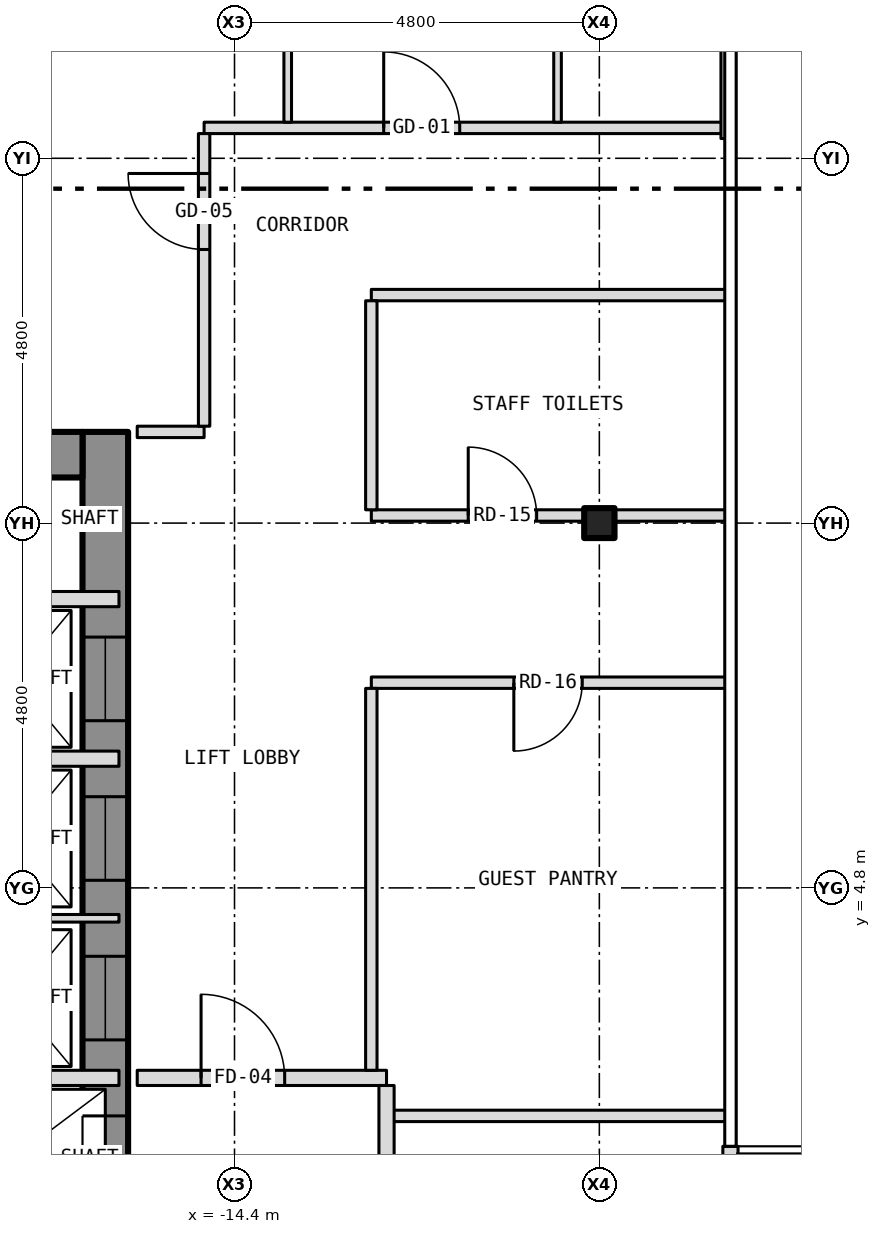
"""IFC4 building model, lengths in metres.
Left out: names, types, materials, properties, quantities, classifications, styles, units other than length and angle.
Written with IfcOpenShell. Run it as: python <this file> out.ifc"""

import sys

from ifc_helpers import new_model, si_unit, direction, frame, frame_2d, origin, origin_2d, place, context, subcontext, project, spatial, rectangle, i_section, extrude, element, fill, save


model = new_model("IFC4")
c1 = context("Model", 3, precision=1e-05, world=origin(), true_north=direction((0.0, 1.0)))
c2 = subcontext(c1, "Body", "Model", "MODEL_VIEW")
j1 = project(units=[si_unit("LENGTHUNIT", "METRE"), si_unit("PLANEANGLEUNIT", "RADIAN")], contexts=[c1])
p1 = place(None, origin())
s1 = spatial("IfcSite", under=j1, at=p1, CompositionType="ELEMENT")
p2 = place(p1, origin())
s2 = spatial("IfcBuilding", under=s1, at=p2, CompositionType="ELEMENT")
p3 = place(p2, frame((0.0, 0.0, 131.0)))
s3 = spatial("IfcBuildingStorey", under=s2, at=p3, CompositionType="ELEMENT", Elevation=131.0)
p4 = place(p3, frame((-9.6, 9.6, -0.15), z_axis=(0.0, 0.0, 1.0), x_axis=(1.0, 0.0, 0.0)))
e1 = element("IfcColumn", 1, at=p4, inside=s3, PredefinedType="COLUMN", context=c2, shape_type="SweptSolid", body=[
    extrude(i_section(OverallWidth=0.399, OverallDepth=0.394, WebThickness=0.023, FlangeThickness=0.037, at=origin_2d()), origin(), (0.0, 0.0, 1.0), 3.5),
])
p5 = place(p3, frame((-16.1, -10.8, 0.0), z_axis=(0.0, 0.0, 1.0), x_axis=(0.0, 1.0, 0.0)))
e2 = element("IfcWall", 2, at=p5, inside=s3, PredefinedType="SHEAR", context=c2, shape_type="SweptSolid", body=[
    extrude(rectangle(XDim=21.6, YDim=0.6, at=frame_2d((10.8, 0.0))), origin(), (0.0, 0.0, 1.0), 3.25),
])
p6 = place(p5, frame((9.4, 0.0, 0.0)))
e3 = element("IfcOpeningElement", 3, at=p6, cuts=e2, PredefinedType="OPENING", context=c2, shape_type="SweptSolid", body=[
    extrude(rectangle(XDim=1.1, YDim=2.1, at=frame_2d((0.55, 1.05))), frame((0.0, 0.312, 0.0), z_axis=(0.0, -1.0, 0.0), x_axis=(1.0, 0.0, 0.0)), (0.0, 0.0, 1.0), 0.624),
])
p7 = place(p5, frame((11.5, 0.0, 0.0)))
e4 = element("IfcOpeningElement", 4, at=p7, cuts=e2, PredefinedType="OPENING", context=c2, shape_type="SweptSolid", body=[
    extrude(rectangle(XDim=1.1, YDim=2.1, at=frame_2d((0.55, 1.05))), frame((0.0, 0.312, 0.0), z_axis=(0.0, -1.0, 0.0), x_axis=(1.0, 0.0, 0.0)), (0.0, 0.0, 1.0), 0.624),
])
p8 = place(p5, frame((13.6, 0.0, 0.0)))
e5 = element("IfcOpeningElement", 5, at=p8, cuts=e2, PredefinedType="OPENING", context=c2, shape_type="SweptSolid", body=[
    extrude(rectangle(XDim=1.1, YDim=2.1, at=frame_2d((0.55, 1.05))), frame((0.0, 0.312, 0.0), z_axis=(0.0, -1.0, 0.0), x_axis=(1.0, 0.0, 0.0)), (0.0, 0.0, 1.0), 0.624),
])
p9 = place(p5, frame((15.7, 0.0, 0.0)))
e6 = element("IfcOpeningElement", 6, at=p9, cuts=e2, PredefinedType="OPENING", context=c2, shape_type="SweptSolid", body=[
    extrude(rectangle(XDim=1.1, YDim=2.1, at=frame_2d((0.55, 1.05))), frame((0.0, 0.312, 0.0), z_axis=(0.0, -1.0, 0.0), x_axis=(1.0, 0.0, 0.0)), (0.0, 0.0, 1.0), 0.624),
])
p10 = place(p5, frame((17.8, 0.0, 0.0)))
e7 = element("IfcOpeningElement", 7, at=p10, cuts=e2, PredefinedType="OPENING", context=c2, shape_type="SweptSolid", body=[
    extrude(rectangle(XDim=1.1, YDim=2.1, at=frame_2d((0.55, 1.05))), frame((0.0, 0.312, 0.0), z_axis=(0.0, -1.0, 0.0), x_axis=(1.0, 0.0, 0.0)), (0.0, 0.0, 1.0), 0.624),
])
p11 = place(p5, frame((0.758, 0.0, 0.0)))
e8 = element("IfcOpeningElement", 8, at=p11, cuts=e2, PredefinedType="OPENING", context=c2, shape_type="SweptSolid", body=[
    extrude(rectangle(XDim=1.1, YDim=2.1, at=frame_2d((0.55, 1.05))), frame((0.0, 0.312, 0.0), z_axis=(0.0, -1.0, 0.0), x_axis=(1.0, 0.0, 0.0)), (0.0, 0.0, 1.0), 0.624),
])
p12 = place(p5, frame((7.5, 0.0, 0.0)))
e9 = element("IfcOpeningElement", 9, at=p12, cuts=e2, PredefinedType="OPENING", context=c2, shape_type="SweptSolid", body=[
    extrude(rectangle(XDim=1.1, YDim=2.1, at=frame_2d((0.55, 1.05))), frame((0.0, 0.312, 0.0), z_axis=(0.0, -1.0, 0.0), x_axis=(1.0, 0.0, 0.0)), (0.0, 0.0, 1.0), 0.624),
])
p13 = place(p3, frame((-22.2, 10.5, 0.0), z_axis=(0.0, 0.0, 1.0), x_axis=(1.0, 0.0, 0.0)))
e10 = element("IfcWall", 10, at=p13, inside=s3, PredefinedType="SHEAR", context=c2, shape_type="SweptSolid", body=[
    extrude(rectangle(XDim=5.8, YDim=0.6, at=frame_2d((2.9, 0.0))), origin(), (0.0, 0.0, 1.0), 3.25),
])
p14 = place(p3, frame((-7.875, -1.4, 0.0), z_axis=(0.0, 0.0, 1.0), x_axis=(0.0, 1.0, 0.0)))
e11 = element("IfcWall", 11, at=p14, inside=s3, PredefinedType="SOLIDWALL", context=c2, shape_type="SweptSolid", body=[
    extrude(rectangle(XDim=2.8, YDim=0.2, at=frame_2d((1.4, 0.0))), origin(), (0.0, 0.0, 1.0), 3.5),
])
p15 = place(p14, frame((0.5, 0.0, 0.0)))
e12 = element("IfcOpeningElement", 12, at=p15, cuts=e11, PredefinedType="OPENING", context=c2, shape_type="SweptSolid", body=[
    extrude(rectangle(XDim=1.8, YDim=2.1, at=frame_2d((0.9, 1.05))), frame((0.0, 0.112, 0.0), z_axis=(0.0, -1.0, 0.0), x_axis=(1.0, 0.0, 0.0)), (0.0, 0.0, 1.0), 0.224),
])
p16 = place(p3, frame((-12.4, 1.8, 0.0), z_axis=(0.0, 0.0, 1.0), x_axis=(1.0, 0.0, 0.0)))
e13 = element("IfcWall", 13, at=p16, inside=s3, PredefinedType="PARTITIONING", context=c2, shape_type="SweptSolid", body=[
    extrude(rectangle(XDim=4.48, YDim=0.15, at=frame_2d((2.24, 0.0))), origin(), (0.0, 0.0, 1.0), 3.35),
])
p17 = place(p3, frame((-18.8, 2.3, 0.0), z_axis=(0.0, 0.0, 1.0), x_axis=(1.0, 0.0, 0.0)))
e14 = element("IfcWall", 14, at=p17, inside=s3, PredefinedType="PARTITIONING", context=c2, shape_type="SweptSolid", body=[
    extrude(rectangle(XDim=2.88, YDim=0.2, at=frame_2d((1.44, 0.0))), origin(), (0.0, 0.0, 1.0), 3.25),
])
p18 = place(p3, frame((-15.68, 2.3, 0.0), z_axis=(0.0, 0.0, 1.0), x_axis=(1.0, 0.0, 0.0)))
e15 = element("IfcWall", 15, at=p18, inside=s3, PredefinedType="PARTITIONING", context=c2, shape_type="SweptSolid", body=[
    extrude(rectangle(XDim=3.28, YDim=0.2, at=frame_2d((1.64, 0.0))), origin(), (0.0, 0.0, 1.0), 3.35),
])
p19 = place(p18, frame((0.84, 0.0, 0.0)))
e16 = element("IfcOpeningElement", 16, at=p19, cuts=e15, PredefinedType="OPENING", context=c2, shape_type="SweptSolid", body=[
    extrude(rectangle(XDim=1.1, YDim=2.1, at=frame_2d((0.55, 1.05))), frame((0.0, 0.112, 0.0), z_axis=(0.0, -1.0, 0.0), x_axis=(1.0, 0.0, 0.0)), (0.0, 0.0, 1.0), 0.224),
])
p20 = place(p3, frame((-22.68, 4.4, 0.0), z_axis=(0.0, 0.0, 1.0), x_axis=(1.0, 0.0, 0.0)))
e17 = element("IfcWall", 17, at=p20, inside=s3, PredefinedType="PARTITIONING", context=c2, shape_type="SweptSolid", body=[
    extrude(rectangle(XDim=6.76, YDim=0.1, at=frame_2d((3.38, 0.0))), origin(), (0.0, 0.0, 1.0), 3.25),
])
p21 = place(p20, frame((1.43, 0.0, 0.0)))
e18 = element("IfcOpeningElement", 18, at=p21, cuts=e17, PredefinedType="OPENING", context=c2, shape_type="SweptSolid", body=[
    extrude(rectangle(XDim=0.9, YDim=2.1, at=frame_2d((0.45, 1.05))), frame((0.0, 0.062, 0.0), z_axis=(0.0, -1.0, 0.0), x_axis=(1.0, 0.0, 0.0)), (0.0, 0.0, 1.0), 0.124),
])
p22 = place(p3, frame((-18.8, 6.5, 0.0), z_axis=(0.0, 0.0, 1.0), x_axis=(1.0, 0.0, 0.0)))
e19 = element("IfcWall", 19, at=p22, inside=s3, PredefinedType="PARTITIONING", context=c2, shape_type="SweptSolid", body=[
    extrude(rectangle(XDim=2.88, YDim=0.2, at=frame_2d((1.44, 0.0))), origin(), (0.0, 0.0, 1.0), 3.25),
])
p23 = place(p3, frame((-12.6, 7.5, 0.0), z_axis=(0.0, 0.0, 1.0), x_axis=(1.0, 0.0, 0.0)))
e20 = element("IfcWall", 20, at=p23, inside=s3, PredefinedType="PARTITIONING", context=c2, shape_type="SweptSolid", body=[
    extrude(rectangle(XDim=4.68, YDim=0.15, at=frame_2d((2.34, 0.0))), origin(), (0.0, 0.0, 1.0), 3.35),
])
p24 = place(p23, frame((1.875, 0.0, 0.0)))
e21 = element("IfcOpeningElement", 21, at=p24, cuts=e20, PredefinedType="OPENING", context=c2, shape_type="SweptSolid", body=[
    extrude(rectangle(XDim=0.9, YDim=2.1, at=frame_2d((0.45, 1.05))), frame((0.0, 0.087, 0.0), z_axis=(0.0, -1.0, 0.0), x_axis=(1.0, 0.0, 0.0)), (0.0, 0.0, 1.0), 0.174),
])
p25 = place(p3, frame((-18.8, 8.6, 0.0), z_axis=(0.0, 0.0, 1.0), x_axis=(1.0, 0.0, 0.0)))
e22 = element("IfcWall", 22, at=p25, inside=s3, PredefinedType="PARTITIONING", context=c2, shape_type="SweptSolid", body=[
    extrude(rectangle(XDim=2.88, YDim=0.2, at=frame_2d((1.44, 0.0))), origin(), (0.0, 0.0, 1.0), 3.25),
])
p26 = place(p3, frame((-12.6, 9.7, 0.0), z_axis=(0.0, 0.0, 1.0), x_axis=(1.0, 0.0, 0.0)))
e23 = element("IfcWall", 23, at=p26, inside=s3, PredefinedType="PARTITIONING", context=c2, shape_type="SweptSolid", body=[
    extrude(rectangle(XDim=2.801, YDim=0.15, at=frame_2d((1.4, 0.0))), origin(), (0.0, 0.0, 1.0), 2.728),
])
p27 = place(p26, frame((1.275, 0.0, 0.0)))
e24 = element("IfcOpeningElement", 24, at=p27, cuts=e23, PredefinedType="OPENING", context=c2, shape_type="SweptSolid", body=[
    extrude(rectangle(XDim=0.9, YDim=2.1, at=frame_2d((0.45, 1.05))), frame((0.0, 0.087, 0.0), z_axis=(0.0, -1.0, 0.0), x_axis=(1.0, 0.0, 0.0)), (0.0, 0.0, 1.0), 0.174),
])
p28 = place(p3, frame((-9.799, 9.7, 0.0), z_axis=(0.0, 0.0, 1.0), x_axis=(1.0, 0.0, 0.0)))
e25 = element("IfcWall", 25, at=p28, inside=s3, PredefinedType="PARTITIONING", context=c2, shape_type="SweptSolid", body=[
    extrude(rectangle(XDim=0.398, YDim=0.15, at=frame_2d((0.199, 0.0))), origin(), (0.0, 0.0, 1.0), 3.35),
])
p29 = place(p3, frame((-9.401, 9.7, 0.0), z_axis=(0.0, 0.0, 1.0), x_axis=(1.0, 0.0, 0.0)))
e26 = element("IfcWall", 26, at=p29, inside=s3, PredefinedType="PARTITIONING", context=c2, shape_type="SweptSolid", body=[
    extrude(rectangle(XDim=1.481, YDim=0.15, at=frame_2d((0.74, 0.0))), origin(), (0.0, 0.0, 1.0), 2.728),
])
p30 = place(p3, frame((-15.68, 10.8, 0.0), z_axis=(0.0, 0.0, 1.0), x_axis=(1.0, 0.0, 0.0)))
e27 = element("IfcWall", 27, at=p30, inside=s3, PredefinedType="PARTITIONING", context=c2, shape_type="SweptSolid", body=[
    extrude(rectangle(XDim=0.88, YDim=0.15, at=frame_2d((0.44, 0.0))), origin(), (0.0, 0.0, 1.0), 3.35),
])
p31 = place(p3, frame((-12.6, 12.6, 0.0), z_axis=(0.0, 0.0, 1.0), x_axis=(1.0, 0.0, 0.0)))
e28 = element("IfcWall", 28, at=p31, inside=s3, PredefinedType="PARTITIONING", context=c2, shape_type="SweptSolid", body=[
    extrude(rectangle(XDim=4.68, YDim=0.15, at=frame_2d((2.34, 0.0))), origin(), (0.0, 0.0, 1.0), 3.35),
])
p32 = place(p3, frame((-14.8, 14.8, 0.0), z_axis=(0.0, 0.0, 1.0), x_axis=(1.0, 0.0, 0.0)))
e29 = element("IfcWall", 29, at=p32, inside=s3, PredefinedType="PARTITIONING", context=c2, shape_type="SweptSolid", body=[
    extrude(rectangle(XDim=6.85, YDim=0.15, at=frame_2d((3.425, 0.0))), origin(), (0.0, 0.0, 1.0), 3.35),
])
p33 = place(p32, frame((2.363, 0.0, 0.0)))
e30 = element("IfcOpeningElement", 30, at=p33, cuts=e29, PredefinedType="OPENING", context=c2, shape_type="SweptSolid", body=[
    extrude(rectangle(XDim=1.0, YDim=2.1, at=frame_2d((0.5, 1.05))), frame((0.0, 0.087, 0.0), z_axis=(0.0, -1.0, 0.0), x_axis=(1.0, 0.0, 0.0)), (0.0, 0.0, 1.0), 0.174),
])
p34 = place(p3, frame((-14.8, 10.875, 0.0), z_axis=(0.0, 0.0, 1.0), x_axis=(0.0, 1.0, 0.0)))
e31 = element("IfcWall", 31, at=p34, inside=s3, PredefinedType="PARTITIONING", context=c2, shape_type="SweptSolid", body=[
    extrude(rectangle(XDim=3.85, YDim=0.15, at=frame_2d((1.925, 0.0))), origin(), (0.0, 0.0, 1.0), 3.35),
])
p35 = place(p34, frame((2.325, 0.0, 0.0)))
e32 = element("IfcOpeningElement", 32, at=p35, cuts=e31, PredefinedType="OPENING", context=c2, shape_type="SweptSolid", body=[
    extrude(rectangle(XDim=1.0, YDim=2.1, at=frame_2d((0.5, 1.05))), frame((0.0, 0.087, 0.0), z_axis=(0.0, -1.0, 0.0), x_axis=(1.0, 0.0, 0.0)), (0.0, 0.0, 1.0), 0.174),
])
p36 = place(p3, frame((-13.7, 14.875, 0.0), z_axis=(0.0, 0.0, 1.0), x_axis=(0.0, 1.0, 0.0)))
e33 = element("IfcWall", 33, at=p36, inside=s3, PredefinedType="PARTITIONING", context=c2, shape_type="SweptSolid", body=[
    extrude(rectangle(XDim=7.805, YDim=0.1, at=frame_2d((3.902, 0.0))), origin(), (0.0, 0.0, 1.0), 3.35),
])
p37 = place(p3, frame((-12.6, 2.4, 0.0), z_axis=(0.0, 0.0, 1.0), x_axis=(0.0, 1.0, 0.0)))
e34 = element("IfcWall", 34, at=p37, inside=s3, PredefinedType="PARTITIONING", context=c2, shape_type="SweptSolid", body=[
    extrude(rectangle(XDim=5.025, YDim=0.15, at=frame_2d((2.513, 0.0))), origin(), (0.0, 0.0, 1.0), 3.35),
])
p38 = place(p3, frame((-12.6, 9.775, 0.0), z_axis=(0.0, 0.0, 1.0), x_axis=(0.0, 1.0, 0.0)))
e35 = element("IfcWall", 35, at=p38, inside=s3, PredefinedType="PARTITIONING", context=c2, shape_type="SweptSolid", body=[
    extrude(rectangle(XDim=2.75, YDim=0.15, at=frame_2d((1.375, 0.0))), origin(), (0.0, 0.0, 1.0), 3.35),
])
p39 = place(p3, frame((-12.4, -1.8, 0.0), z_axis=(0.0, 0.0, 1.0), x_axis=(0.0, 1.0, 0.0)))
e36 = element("IfcWall", 36, at=p39, inside=s3, PredefinedType="PARTITIONING", context=c2, shape_type="SweptSolid", body=[
    extrude(rectangle(XDim=4.0, YDim=0.2, at=frame_2d((2.0, 0.0))), origin(), (0.0, 0.0, 1.0), 3.35),
])
p40 = place(p39, frame((1.25, 0.0, 0.0)))
e37 = element("IfcOpeningElement", 37, at=p40, cuts=e36, PredefinedType="OPENING", context=c2, shape_type="SweptSolid", body=[
    extrude(rectangle(XDim=1.1, YDim=2.1, at=frame_2d((0.55, 1.05))), frame((0.0, 0.112, 0.0), z_axis=(0.0, -1.0, 0.0), x_axis=(1.0, 0.0, 0.0)), (0.0, 0.0, 1.0), 0.224),
])
p41 = place(p3, frame((-10.15, 14.875, 0.0), z_axis=(0.0, 0.0, 1.0), x_axis=(0.0, 1.0, 0.0)))
e38 = element("IfcWall", 38, at=p41, inside=s3, PredefinedType="PARTITIONING", context=c2, shape_type="SweptSolid", body=[
    extrude(rectangle(XDim=3.075, YDim=0.1, at=frame_2d((1.538, 0.0))), origin(), (0.0, 0.0, 1.0), 3.35),
])
p42 = place(p41, frame((1.971, 0.0, 0.0)))
e39 = element("IfcOpeningElement", 39, at=p42, cuts=e38, PredefinedType="OPENING", context=c2, shape_type="SweptSolid", body=[
    extrude(rectangle(XDim=0.9, YDim=2.1, at=frame_2d((0.45, 1.05))), frame((0.0, 0.062, 0.0), z_axis=(0.0, -1.0, 0.0), x_axis=(1.0, 0.0, 0.0)), (0.0, 0.0, 1.0), 0.124),
])
p43 = place(p3, frame((-7.95, 14.66, 0.0), z_axis=(0.0, 0.0, 1.0), x_axis=(0.0, 1.0, 0.0)))
e40 = element("IfcWall", 40, at=p43, inside=s3, PredefinedType="PARTITIONING", context=c2, shape_type="SweptSolid", body=[
    extrude(rectangle(XDim=3.48, YDim=0.1, at=frame_2d((1.74, 0.0))), origin(), (0.0, 0.0, 1.0), 2.733),
])
p44 = place(p7, origin())
e41 = element("IfcDoor", 41, at=p44, inside=s3, OperationType="SLIDING_TO_LEFT", PredefinedType="DOOR", context=c2, shape_type="SweptSolid", body=[
    extrude(rectangle(XDim=1.1, YDim=2.1, at=frame_2d((0.55, 1.05))), frame((0.0, 0.025, 0.0), z_axis=(0.0, -1.0, 0.0), x_axis=(1.0, 0.0, 0.0)), (0.0, 0.0, 1.0), 0.05),
])
fill(e4, e41)
p45 = place(p8, origin())
e42 = element("IfcDoor", 42, at=p45, inside=s3, OperationType="SLIDING_TO_LEFT", PredefinedType="DOOR", context=c2, shape_type="SweptSolid", body=[
    extrude(rectangle(XDim=1.1, YDim=2.1, at=frame_2d((0.55, 1.05))), frame((0.0, 0.025, 0.0), z_axis=(0.0, -1.0, 0.0), x_axis=(1.0, 0.0, 0.0)), (0.0, 0.0, 1.0), 0.05),
])
fill(e5, e42)
p46 = place(p9, origin())
e43 = element("IfcDoor", 43, at=p46, inside=s3, OperationType="SLIDING_TO_LEFT", PredefinedType="DOOR", context=c2, shape_type="SweptSolid", body=[
    extrude(rectangle(XDim=1.1, YDim=2.1, at=frame_2d((0.55, 1.05))), frame((0.0, 0.025, 0.0), z_axis=(0.0, -1.0, 0.0), x_axis=(1.0, 0.0, 0.0)), (0.0, 0.0, 1.0), 0.05),
])
fill(e6, e43)
p47 = place(p10, origin())
e44 = element("IfcDoor", 44, at=p47, inside=s3, OperationType="SLIDING_TO_LEFT", PredefinedType="DOOR", context=c2, shape_type="SweptSolid", body=[
    extrude(rectangle(XDim=1.1, YDim=2.1, at=frame_2d((0.55, 1.05))), frame((0.0, 0.025, 0.0), z_axis=(0.0, -1.0, 0.0), x_axis=(1.0, 0.0, 0.0)), (0.0, 0.0, 1.0), 0.05),
])
fill(e7, e44)
p48 = place(p19, origin())
e45 = element("IfcDoor", 45, at=p48, inside=s3, OperationType="SINGLE_SWING_LEFT", PredefinedType="DOOR", context=c2, shape_type="SweptSolid", body=[
    extrude(rectangle(XDim=1.1, YDim=2.1, at=frame_2d((0.55, 1.05))), frame((0.0, 0.025, 0.0), z_axis=(0.0, -1.0, 0.0), x_axis=(1.0, 0.0, 0.0)), (0.0, 0.0, 1.0), 0.05),
])
fill(e16, e45)
p49 = place(p33, origin())
e46 = element("IfcDoor", 46, at=p49, inside=s3, OperationType="SINGLE_SWING_LEFT", PredefinedType="DOOR", context=c2, shape_type="SweptSolid", body=[
    extrude(rectangle(XDim=1.0, YDim=2.1, at=frame_2d((0.5, 1.05))), frame((0.0, 0.025, 0.0), z_axis=(0.0, -1.0, 0.0), x_axis=(1.0, 0.0, 0.0)), (0.0, 0.0, 1.0), 0.05),
])
fill(e30, e46)
p50 = place(p35, origin())
e47 = element("IfcDoor", 47, at=p50, inside=s3, OperationType="SINGLE_SWING_RIGHT", PredefinedType="DOOR", context=c2, shape_type="SweptSolid", body=[
    extrude(rectangle(XDim=1.0, YDim=2.1, at=frame_2d((0.5, 1.05))), frame((0.0, 0.025, 0.0), z_axis=(0.0, -1.0, 0.0), x_axis=(1.0, 0.0, 0.0)), (0.0, 0.0, 1.0), 0.05),
])
fill(e32, e47)
p51 = place(p27, origin())
e48 = element("IfcDoor", 48, at=p51, inside=s3, OperationType="SINGLE_SWING_LEFT", PredefinedType="DOOR", context=c2, shape_type="SweptSolid", body=[
    extrude(rectangle(XDim=0.9, YDim=2.1, at=frame_2d((0.45, 1.05))), frame((0.0, 0.025, 0.0), z_axis=(0.0, -1.0, 0.0), x_axis=(1.0, 0.0, 0.0)), (0.0, 0.0, 1.0), 0.05),
])
fill(e24, e48)
p52 = place(p24, origin())
e49 = element("IfcDoor", 49, at=p52, inside=s3, OperationType="SINGLE_SWING_LEFT", PredefinedType="DOOR", context=c2, shape_type="SweptSolid", body=[
    extrude(rectangle(XDim=0.9, YDim=2.1, at=frame_2d((0.45, 1.05))), frame((0.0, 0.025, 0.0), z_axis=(0.0, -1.0, 0.0), x_axis=(1.0, 0.0, 0.0)), (0.0, 0.0, 1.0), 0.05),
])
fill(e21, e49)
save(model, sys.argv[1])
